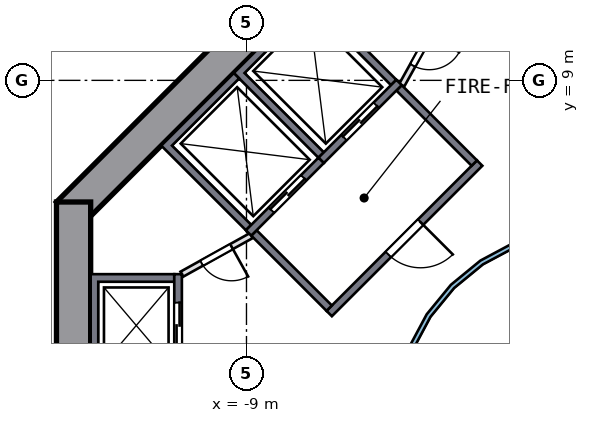
"""IFC4 building model, lengths in metres.
Left out: names, types, materials, properties, quantities, classifications, styles, units other than length and angle.
Written with IfcOpenShell. Run it as: python <this file> out.ifc"""

import sys

from ifc_helpers import new_model, si_unit, direction, frame, frame_2d, origin, place, context, subcontext, project, spatial, polyline, rectangle, outline, extrude, element, fill, save


model = new_model("IFC4")
c1 = context("Model", 3, precision=1e-05, world=origin(), true_north=direction((0.0, 1.0)))
c2 = subcontext(c1, "Body", "Model", "MODEL_VIEW")
j1 = project(units=[si_unit("LENGTHUNIT", "METRE"), si_unit("PLANEANGLEUNIT", "RADIAN")], contexts=[c1])
p1 = place(None, origin())
s1 = spatial("IfcSite", under=j1, at=p1, CompositionType="ELEMENT")
p2 = place(p1, origin())
s2 = spatial("IfcBuilding", under=s1, at=p2, CompositionType="ELEMENT")
p3 = place(p2, frame((0.0, 0.0, 53.0)))
s3 = spatial("IfcBuildingStorey", under=s2, at=p3, CompositionType="ELEMENT", Elevation=53.0)
p4 = place(p3, frame((-5.481, 13.682, 0.0), z_axis=(0.0, 0.0, 1.0), x_axis=(-0.707106781, -0.707106781, 0.0)))
e1 = element("IfcWall", 1, at=p4, inside=s3, PredefinedType="SHEAR", context=c2, shape_type="SweptSolid", body=[
    extrude(rectangle(XDim=11.598, YDim=0.9, at=frame_2d((5.799, 0.0))), origin(), (0.0, 0.0, 1.0), 3.5),
])
p5 = place(p3, frame((-13.55, 5.799, 0.0), z_axis=(0.0, 0.0, 1.0), x_axis=(0.0, -1.0, 0.0)))
e2 = element("IfcWall", 2, at=p5, inside=s3, PredefinedType="SHEAR", context=c2, shape_type="SweptSolid", body=[
    extrude(rectangle(XDim=11.598, YDim=0.9, at=frame_2d((5.799, 0.0))), origin(), (0.0, 0.0, 1.0), 3.5),
])
p6 = place(p5, frame((4.899, 0.0, 0.0)))
e3 = element("IfcOpeningElement", 3, at=p6, cuts=e2, PredefinedType="OPENING", context=c2, shape_type="SweptSolid", body=[
    extrude(rectangle(XDim=1.8, YDim=2.1, at=frame_2d((0.9, 1.05))), frame((0.0, 0.46, 0.0), z_axis=(0.0, -1.0, 0.0), x_axis=(1.0, 0.0, 0.0)), (0.0, 0.0, 1.0), 0.92),
])
p7 = place(p3, origin())
e4 = element("IfcWall", 4, at=p7, inside=s3, PredefinedType="SOLIDWALL", context=c2, shape_type="SweptSolid", body=[
    extrude(outline(polyline([(-13.1, 3.9), (-10.9, 3.9), (-10.9, 3.7), (-12.9, 3.7), (-12.9, 1.4), (-10.9, 1.4), (-10.9, 1.2), (-13.1, 1.2), (-13.1, 3.9)])), origin(), (0.0, 0.0, 1.0), 3.19),
])
p8 = place(p3, frame((-10.8, 1.2, 0.0), z_axis=(0.0, 0.0, 1.0), x_axis=(0.0, 1.0, 0.0)))
e5 = element("IfcWall", 5, at=p8, inside=s3, PredefinedType="SOLIDWALL", context=c2, shape_type="SweptSolid", body=[
    extrude(rectangle(XDim=2.7, YDim=0.2, at=frame_2d((1.35, 0.0))), origin(), (0.0, 0.0, 1.0), 3.19),
])
p9 = place(p8, frame((0.75, 0.0, 0.0)))
e6 = element("IfcOpeningElement", 6, at=p9, cuts=e5, PredefinedType="OPENING", context=c2, shape_type="SweptSolid", body=[
    extrude(rectangle(XDim=1.2, YDim=2.1, at=frame_2d((0.6, 1.05))), frame((0.0, 0.11, 0.0), z_axis=(0.0, -1.0, 0.0), x_axis=(1.0, 0.0, 0.0)), (0.0, 0.0, 1.0), 0.22),
])
p10 = place(p3, origin())
e7 = element("IfcWall", 7, at=p10, inside=s3, PredefinedType="SOLIDWALL", context=c2, shape_type="SweptSolid", body=[
    extrude(outline(polyline([(-9.334, 9.192), (-7.283, 11.243), (-5.056, 9.016), (-5.197, 8.874), (-7.283, 10.96), (-9.051, 9.192), (-6.965, 7.106), (-7.106, 6.965), (-9.334, 9.192)])), origin(), (0.0, 0.0, 1.0), 3.19),
])
p11 = place(p3, frame((-4.985, 8.945, 0.0), z_axis=(0.0, 0.0, 1.0), x_axis=(-0.707106781, -0.707106781, 0.0)))
e8 = element("IfcWall", 8, at=p11, inside=s3, PredefinedType="SOLIDWALL", context=c2, shape_type="SweptSolid", body=[
    extrude(rectangle(XDim=2.9, YDim=0.2, at=frame_2d((1.45, 0.0))), origin(), (0.0, 0.0, 1.0), 3.19),
])
p12 = place(p11, frame((0.85, 0.0, 0.0)))
e9 = element("IfcOpeningElement", 9, at=p12, cuts=e8, PredefinedType="OPENING", context=c2, shape_type="SweptSolid", body=[
    extrude(rectangle(XDim=1.2, YDim=2.1, at=frame_2d((0.6, 1.05))), frame((0.0, 0.11, 0.0), z_axis=(0.0, -1.0, 0.0), x_axis=(1.0, 0.0, 0.0)), (0.0, 0.0, 1.0), 0.22),
])
p13 = place(p3, origin())
e10 = element("IfcWall", 10, at=p13, inside=s3, PredefinedType="SOLIDWALL", context=c2, shape_type="SweptSolid", body=[
    extrude(outline(polyline([(-11.243, 7.283), (-9.334, 9.192), (-9.192, 9.051), (-10.96, 7.283), (-8.874, 5.197), (-9.016, 5.056), (-11.243, 7.283)])), origin(), (0.0, 0.0, 1.0), 3.19),
])
p14 = place(p3, frame((-7.036, 6.894, 0.0), z_axis=(0.0, 0.0, 1.0), x_axis=(-0.707106781, -0.707106781, 0.0)))
e11 = element("IfcWall", 11, at=p14, inside=s3, PredefinedType="SOLIDWALL", context=c2, shape_type="SweptSolid", body=[
    extrude(rectangle(XDim=2.7, YDim=0.2, at=frame_2d((1.35, 0.0))), origin(), (0.0, 0.0, 1.0), 3.19),
])
p15 = place(p14, frame((0.65, 0.0, 0.0)))
e12 = element("IfcOpeningElement", 12, at=p15, cuts=e11, PredefinedType="OPENING", context=c2, shape_type="SweptSolid", body=[
    extrude(rectangle(XDim=1.2, YDim=2.1, at=frame_2d((0.6, 1.05))), frame((0.0, 0.11, 0.0), z_axis=(0.0, -1.0, 0.0), x_axis=(1.0, 0.0, 0.0)), (0.0, 0.0, 1.0), 0.22),
])
p16 = place(p3, frame((-2.864, 6.823, 0.0), z_axis=(0.0, 0.0, 1.0), x_axis=(-0.707106781, -0.707106781, 0.0)))
e13 = element("IfcWall", 13, at=p16, inside=s3, PredefinedType="SOLIDWALL", context=c2, shape_type="SweptSolid", body=[
    extrude(rectangle(XDim=5.6, YDim=0.2, at=frame_2d((2.8, 0.0))), origin(), (0.0, 0.0, 1.0), 3.19),
])
p17 = place(p16, frame((2.2, 0.0, 0.0)))
e14 = element("IfcOpeningElement", 14, at=p17, cuts=e13, PredefinedType="OPENING", context=c2, shape_type="SweptSolid", body=[
    extrude(rectangle(XDim=1.2, YDim=2.1, at=frame_2d((0.6, 1.05))), frame((0.0, 0.11, 0.0), z_axis=(0.0, -1.0, 0.0), x_axis=(1.0, 0.0, 0.0)), (0.0, 0.0, 1.0), 0.22),
])
for number, where, z_axis, x_axis in (
    (15, (-3.005, 6.823, 0.0), (0.0, 0.0, 1.0), (-0.707, 0.707, 0.0)),
    (16, (-6.823, 3.005, 0.0), (0.0, 0.0, 1.0), (-0.707, 0.707, 0.0)),
):
    element("IfcWall", number, at=place(p3, frame(where, z_axis=z_axis, x_axis=x_axis)), inside=s3, PredefinedType="SOLIDWALL", context=c2, shape_type="SweptSolid", body=[
        extrude(rectangle(XDim=2.8, YDim=0.2, at=frame_2d((1.4, 0.0))), origin(), (0.0, 0.0, 1.0), 3.19),
    ])
p18 = place(p3, frame((-3.9, 10.7, 0.0), z_axis=(0.0, 0.0, 1.0), x_axis=(-0.485692555, -0.874129705, 0.0)))
e17 = element("IfcWall", 17, at=p18, inside=s3, PredefinedType="PARTITIONING", context=c2, shape_type="SweptSolid", body=[
    extrude(rectangle(XDim=2.089, YDim=0.15, at=frame_2d((1.044, 0.0))), origin(), (0.0, 0.0, 1.0), 3.19),
])
p19 = place(p18, frame((0.594, 0.0, 0.0)))
e18 = element("IfcOpeningElement", 18, at=p19, cuts=e17, PredefinedType="OPENING", context=c2, shape_type="SweptSolid", body=[
    extrude(rectangle(XDim=0.9, YDim=2.1, at=frame_2d((0.45, 1.05))), frame((0.0, 0.085, 0.0), z_axis=(0.0, -1.0, 0.0), x_axis=(1.0, 0.0, 0.0)), (0.0, 0.0, 1.0), 0.17),
])
p20 = place(p3, frame((-8.874, 4.914, 0.0), z_axis=(0.0, 0.0, 1.0), x_axis=(-0.874129705, -0.485692555, 0.0)))
e19 = element("IfcWall", 19, at=p20, inside=s3, PredefinedType="PARTITIONING", context=c2, shape_type="SweptSolid", body=[
    extrude(rectangle(XDim=2.089, YDim=0.15, at=frame_2d((1.044, 0.0))), origin(), (0.0, 0.0, 1.0), 3.19),
])
p21 = place(p20, frame((0.594, 0.0, 0.0)))
e20 = element("IfcOpeningElement", 20, at=p21, cuts=e19, PredefinedType="OPENING", context=c2, shape_type="SweptSolid", body=[
    extrude(rectangle(XDim=0.9, YDim=2.1, at=frame_2d((0.45, 1.05))), frame((0.0, 0.085, 0.0), z_axis=(0.0, -1.0, 0.0), x_axis=(1.0, 0.0, 0.0)), (0.0, 0.0, 1.0), 0.17),
])
p22 = place(p3, origin())
e21 = element("IfcWall", 21, at=p22, inside=s3, PredefinedType="SOLIDWALL", context=c2, shape_type="SweptSolid", body=[
    extrude(outline(polyline([(5.021, -0.999), (4.73, -1.959), (4.257, -2.844), (3.62, -3.62), (2.844, -4.257), (1.959, -4.73), (0.999, -5.021), (0.0, -5.12), (-0.999, -5.021), (-1.959, -4.73), (-2.844, -4.257), (-3.62, -3.62), (-4.257, -2.844), (-4.73, -1.959), (-5.021, -0.999), (-5.12, 0.0), (-5.021, 0.999), (-4.73, 1.959), (-4.257, 2.844), (-3.62, 3.62), (-2.844, 4.257), (-1.959, 4.73), (-0.999, 5.021), (0.0, 5.12), (0.999, 5.021), (1.959, 4.73), (2.844, 4.257), (3.62, 3.62), (4.257, 2.844), (4.73, 1.959), (5.021, 0.999), (5.12, 0.0), (5.021, -0.999)]), holes=[polyline([(4.904, 0.976), (4.619, 1.913), (4.157, 2.778), (3.535, 3.535), (2.778, 4.157), (1.913, 4.619), (0.976, 4.904), (0.0, 5.0), (-0.976, 4.904), (-1.913, 4.619), (-2.778, 4.157), (-3.535, 3.535), (-4.157, 2.778), (-4.619, 1.913), (-4.904, 0.976), (-5.0, 0.0), (-4.904, -0.976), (-4.619, -1.913), (-4.157, -2.778), (-3.535, -3.535), (-2.778, -4.157), (-1.913, -4.619), (-0.976, -4.904), (0.0, -5.0), (0.976, -4.904), (1.913, -4.619), (2.778, -4.157), (3.535, -3.535), (4.157, -2.778), (4.619, -1.913), (4.904, -0.976), (5.0, 0.0), (4.904, 0.976)])]), origin(), (0.0, 0.0, 1.0), 3.19),
])
p23 = place(p3, frame((-18.009, 3.437, 0.0), z_axis=(0.0, 0.0, 1.0), x_axis=(0.42576737, 0.904832662, 0.0)))
e22 = element("IfcWall", 22, at=p23, inside=s3, PredefinedType="SOLIDWALL", context=c2, shape_type="SweptSolid", body=[
    extrude(rectangle(XDim=9.115, YDim=0.2, at=frame_2d((4.558, 0.0))), origin(), (0.0, 0.0, 1.0), 3.19),
])
p24 = place(p23, frame((0.2, 0.0, 0.0)))
e23 = element("IfcOpeningElement", 23, at=p24, cuts=e22, PredefinedType="OPENING", context=c2, shape_type="SweptSolid", body=[
    extrude(rectangle(XDim=1.0, YDim=2.1, at=frame_2d((0.5, 1.05))), frame((0.0, 0.11, 0.0), z_axis=(0.0, -1.0, 0.0), x_axis=(1.0, 0.0, 0.0)), (0.0, 0.0, 1.0), 0.22),
])
p25 = place(p9, origin())
e24 = element("IfcDoor", 24, at=p25, inside=s3, OperationType="DOUBLE_DOOR_SLIDING", PredefinedType="DOOR", context=c2, shape_type="SweptSolid", body=[
    extrude(rectangle(XDim=1.2, YDim=2.1, at=frame_2d((0.6, 1.05))), frame((0.0, 0.025, 0.0), z_axis=(0.0, -1.0, 0.0), x_axis=(1.0, 0.0, 0.0)), (0.0, 0.0, 1.0), 0.05),
])
fill(e6, e24)
p26 = place(p12, origin())
e25 = element("IfcDoor", 25, at=p26, inside=s3, OperationType="DOUBLE_DOOR_SLIDING", PredefinedType="DOOR", context=c2, shape_type="SweptSolid", body=[
    extrude(rectangle(XDim=1.2, YDim=2.1, at=frame_2d((0.6, 1.05))), frame((0.0, 0.025, 0.0), z_axis=(0.0, -1.0, 0.0), x_axis=(1.0, 0.0, 0.0)), (0.0, 0.0, 1.0), 0.05),
])
fill(e9, e25)
p27 = place(p15, origin())
e26 = element("IfcDoor", 26, at=p27, inside=s3, OperationType="DOUBLE_DOOR_SLIDING", PredefinedType="DOOR", context=c2, shape_type="SweptSolid", body=[
    extrude(rectangle(XDim=1.2, YDim=2.1, at=frame_2d((0.6, 1.05))), frame((0.0, 0.025, 0.0), z_axis=(0.0, -1.0, 0.0), x_axis=(1.0, 0.0, 0.0)), (0.0, 0.0, 1.0), 0.05),
])
fill(e12, e26)
p28 = place(p17, origin())
e27 = element("IfcDoor", 27, at=p28, inside=s3, OperationType="SINGLE_SWING_LEFT", PredefinedType="DOOR", context=c2, shape_type="SweptSolid", body=[
    extrude(rectangle(XDim=1.2, YDim=2.1, at=frame_2d((0.6, 1.05))), frame((0.0, 0.025, 0.0), z_axis=(0.0, -1.0, 0.0), x_axis=(1.0, 0.0, 0.0)), (0.0, 0.0, 1.0), 0.05),
])
fill(e14, e27)
p29 = place(p19, origin())
e28 = element("IfcDoor", 28, at=p29, inside=s3, OperationType="SINGLE_SWING_LEFT", PredefinedType="DOOR", context=c2, shape_type="SweptSolid", body=[
    extrude(rectangle(XDim=0.9, YDim=2.1, at=frame_2d((0.45, 1.05))), frame((0.0, 0.025, 0.0), z_axis=(0.0, -1.0, 0.0), x_axis=(1.0, 0.0, 0.0)), (0.0, 0.0, 1.0), 0.05),
])
fill(e18, e28)
p30 = place(p21, origin())
e29 = element("IfcDoor", 29, at=p30, inside=s3, OperationType="SINGLE_SWING_LEFT", PredefinedType="DOOR", context=c2, shape_type="SweptSolid", body=[
    extrude(rectangle(XDim=0.9, YDim=2.1, at=frame_2d((0.45, 1.05))), frame((0.0, 0.025, 0.0), z_axis=(0.0, -1.0, 0.0), x_axis=(1.0, 0.0, 0.0)), (0.0, 0.0, 1.0), 0.05),
])
fill(e20, e29)
save(model, sys.argv[1])
